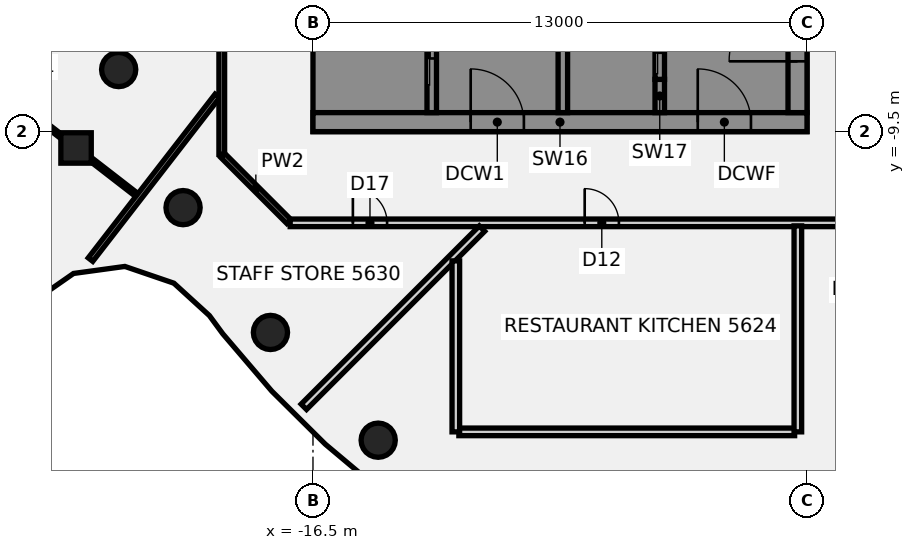
"""IFC4 building model, lengths in metres.
Left out: names, types, materials, properties, quantities, classifications, styles, units other than length and angle.
Written with IfcOpenShell. Run it as: python <this file> out.ifc"""

import sys

from ifc_helpers import new_model, si_unit, direction, frame, frame_2d, origin, origin_2d, place, context, subcontext, project, spatial, polyline, rectangle, circle, outline, extrude, element, fill, save


model = new_model("IFC4")
c1 = context("Model", 3, precision=1e-05, world=origin(), true_north=direction((0.0, 1.0)))
c2 = subcontext(c1, "Body", "Model", "MODEL_VIEW")
j1 = project(units=[si_unit("LENGTHUNIT", "METRE"), si_unit("PLANEANGLEUNIT", "RADIAN")], contexts=[c1])
p1 = place(None, origin())
s1 = spatial("IfcSite", under=j1, at=p1, CompositionType="ELEMENT")
p2 = place(p1, origin())
s2 = spatial("IfcBuilding", under=s1, at=p2, CompositionType="ELEMENT")
p3 = place(p2, frame((0.0, 0.0, 223.5)))
s3 = spatial("IfcBuildingStorey", under=s2, at=p3, CompositionType="ELEMENT", Elevation=223.5)
for number, where, z_axis, x_axis in (
    (1, (-21.613, -7.866, -0.14), (0.0, 0.0, 1.0), (1.0, 0.0, 0.0)),
    (2, (-19.919, -11.5, -0.14), (0.0, 0.0, 1.0), (1.0, 0.0, 0.0)),
    (3, (-17.619, -14.784, -0.14), (0.0, 0.0, 1.0), (1.0, 0.0, 0.0)),
    (4, (-14.784, -17.619, -0.14), (0.0, 0.0, 1.0), (1.0, 0.0, 0.0)),
):
    element("IfcColumn", number, at=place(p3, frame(where, z_axis=z_axis, x_axis=x_axis)), inside=s3, PredefinedType="COLUMN", context=c2, shape_type="SweptSolid", body=[
        extrude(circle(Radius=0.45, at=origin_2d()), origin(), (0.0, 0.0, 1.0), 3.6),
    ])
p4 = place(p3, frame((-22.734, -9.93, -0.139), z_axis=(0.050292303889, -0.003253410494, 0.998729242332), x_axis=(-0.789594273186, 0.612206971223, 0.041755336635)))
e5 = element("IfcColumn", 5, at=p4, inside=s3, PredefinedType="COLUMN", context=c2, shape_type="SweptSolid", body=[
    extrude(rectangle(XDim=0.8, YDim=0.8, at=origin_2d()), origin(), (0.0, 0.0, 1.0), 3.602),
])
p5 = place(p3, frame((-18.872, -10.128, 0.0), z_axis=(0.0, 0.0, 1.0), x_axis=(0.707106781187, -0.707106781187, 0.0)))
e6 = element("IfcWall", 6, at=p5, inside=s3, PredefinedType="PARTITIONING", context=c2, shape_type="SweptSolid", body=[
    extrude(rectangle(XDim=2.455, YDim=0.15, at=frame_2d((1.228, 0.0))), origin(), (0.0, 0.0, 1.0), 2.864),
])
p6 = place(p3, frame((-26.075, -7.343, 0.0), z_axis=(0.0, 0.0, 1.0), x_axis=(0.790607822881, -0.612322848177, 0.0)))
e7 = element("IfcWall", 7, at=p6, inside=s3, PredefinedType="PARTITIONING", context=c2, shape_type="SweptSolid", body=[
    extrude(rectangle(XDim=3.816, YDim=0.1, at=frame_2d((1.908, 0.0))), origin(), (0.0, 0.0, 1.0), 2.864),
])
p7 = place(p3, frame((-22.303, -10.264, 0.0), z_axis=(0.0, 0.0, 1.0), x_axis=(0.790625450637, -0.612300087216, 0.0)))
e8 = element("IfcWall", 8, at=p7, inside=s3, PredefinedType="PARTITIONING", context=c2, shape_type="SweptSolid", body=[
    extrude(rectangle(XDim=1.475, YDim=0.1, at=frame_2d((0.737, 0.0))), origin(), (0.0, 0.0, 1.0), 2.864),
])
p8 = place(p3, frame((-17.1, -11.9, 0.0), z_axis=(0.0, 0.0, 1.0), x_axis=(1.0, 0.0, 0.0)))
e9 = element("IfcWall", 9, at=p8, inside=s3, PredefinedType="PARTITIONING", context=c2, shape_type="SweptSolid", body=[
    extrude(rectangle(XDim=34.165, YDim=0.2, at=frame_2d((17.083, 0.0))), origin(), (0.0, 0.0, 1.0), 2.864),
])
p9 = place(p8, frame((7.75, 0.0, 0.0)))
e10 = element("IfcOpeningElement", 10, at=p9, cuts=e9, PredefinedType="OPENING", context=c2, shape_type="SweptSolid", body=[
    extrude(rectangle(XDim=0.9, YDim=2.1, at=frame_2d((0.45, 1.05))), frame((0.0, 0.11, 0.0), z_axis=(0.0, -1.0, 0.0), x_axis=(1.0, 0.0, 0.0)), (0.0, 0.0, 1.0), 0.22),
])
p10 = place(p8, frame((27.541, 0.0, 0.0)))
e11 = element("IfcOpeningElement", 11, at=p10, cuts=e9, PredefinedType="OPENING", context=c2, shape_type="SweptSolid", body=[
    extrude(rectangle(XDim=0.9, YDim=2.1, at=frame_2d((0.45, 1.05))), frame((0.0, 0.11, 0.0), z_axis=(0.0, -1.0, 0.0), x_axis=(1.0, 0.0, 0.0)), (0.0, 0.0, 1.0), 0.22),
])
p11 = place(p8, frame((16.059, 0.0, 0.0)))
e12 = element("IfcOpeningElement", 12, at=p11, cuts=e9, PredefinedType="OPENING", context=c2, shape_type="SweptSolid", body=[
    extrude(rectangle(XDim=1.8, YDim=2.1, at=frame_2d((0.9, 1.05))), frame((0.0, 0.11, 0.0), z_axis=(0.0, -1.0, 0.0), x_axis=(1.0, 0.0, 0.0)), (0.0, 0.0, 1.0), 0.22),
])
p12 = place(p8, frame((22.548, 0.0, 0.0)))
e13 = element("IfcOpeningElement", 13, at=p12, cuts=e9, PredefinedType="OPENING", context=c2, shape_type="SweptSolid", body=[
    extrude(rectangle(XDim=1.8, YDim=2.1, at=frame_2d((0.9, 1.05))), frame((0.0, 0.11, 0.0), z_axis=(0.0, -1.0, 0.0), x_axis=(1.0, 0.0, 0.0)), (0.0, 0.0, 1.0), 0.22),
])
p13 = place(p8, frame((30.5, 0.0, 0.0)))
e14 = element("IfcOpeningElement", 14, at=p13, cuts=e9, PredefinedType="OPENING", context=c2, shape_type="SweptSolid", body=[
    extrude(rectangle(XDim=0.9, YDim=2.1, at=frame_2d((0.45, 1.05))), frame((0.0, 0.11, 0.0), z_axis=(0.0, -1.0, 0.0), x_axis=(1.0, 0.0, 0.0)), (0.0, 0.0, 1.0), 0.22),
])
p14 = place(p8, frame((1.65, 0.0, 0.0)))
e15 = element("IfcOpeningElement", 15, at=p14, cuts=e9, PredefinedType="OPENING", context=c2, shape_type="SweptSolid", body=[
    extrude(rectangle(XDim=0.9, YDim=2.1, at=frame_2d((0.45, 1.05))), frame((0.0, 0.11, 0.0), z_axis=(0.0, -1.0, 0.0), x_axis=(1.0, 0.0, 0.0)), (0.0, 0.0, 1.0), 0.22),
])
p15 = place(p3, frame((-12.661, -17.4, 0.0), z_axis=(0.0, 0.0, 1.0), x_axis=(1.0, 0.0, 0.0)))
e16 = element("IfcWall", 16, at=p15, inside=s3, PredefinedType="PARTITIONING", context=c2, shape_type="SweptSolid", body=[
    extrude(rectangle(XDim=8.835, YDim=0.2, at=frame_2d((4.417, 0.0))), origin(), (0.0, 0.0, 1.0), 2.864),
])
p16 = place(p3, frame((-16.74, -16.74, 0.0), z_axis=(0.0, 0.0, 1.0), x_axis=(0.707106781187, 0.707106781187, 0.0)))
e17 = element("IfcWall", 17, at=p16, inside=s3, PredefinedType="PARTITIONING", context=c2, shape_type="SweptSolid", body=[
    extrude(rectangle(XDim=6.631, YDim=0.2, at=frame_2d((3.315, 0.0))), origin(), (0.0, 0.0, 1.0), 2.864),
])
p17 = place(p3, frame((-22.354, -12.868, 0.0), z_axis=(0.0, 0.0, 1.0), x_axis=(0.61237013934, 0.790571193787, 0.0)))
e18 = element("IfcWall", 18, at=p17, inside=s3, PredefinedType="PARTITIONING", context=c2, shape_type="SweptSolid", body=[
    extrude(rectangle(XDim=5.45, YDim=0.15, at=frame_2d((2.725, 0.0))), origin(), (0.0, 0.0, 1.0), 2.864),
])
p18 = place(p3, frame((-18.9, -10.1, 0.0), z_axis=(0.0, 0.0, 1.0), x_axis=(0.0, 1.0, 0.0)))
e19 = element("IfcWall", 19, at=p18, inside=s3, PredefinedType="PARTITIONING", context=c2, shape_type="SweptSolid", body=[
    extrude(rectangle(XDim=20.2, YDim=0.15, at=frame_2d((10.1, 0.0))), origin(), (0.0, 0.0, 1.0), 2.864),
])
p19 = place(p18, frame((13.439, 0.0, 0.0)))
e20 = element("IfcOpeningElement", 20, at=p19, cuts=e19, PredefinedType="OPENING", context=c2, shape_type="SweptSolid", body=[
    extrude(rectangle(XDim=1.8, YDim=2.1, at=frame_2d((0.9, 1.05))), frame((0.0, 0.085, 0.0), z_axis=(0.0, -1.0, 0.0), x_axis=(1.0, 0.0, 0.0)), (0.0, 0.0, 1.0), 0.17),
])
p20 = place(p18, frame((5.592, 0.0, 0.0)))
e21 = element("IfcOpeningElement", 21, at=p20, cuts=e19, PredefinedType="OPENING", context=c2, shape_type="SweptSolid", body=[
    extrude(rectangle(XDim=0.9, YDim=2.1, at=frame_2d((0.45, 1.05))), frame((0.0, 0.085, 0.0), z_axis=(0.0, -1.0, 0.0), x_axis=(1.0, 0.0, 0.0)), (0.0, 0.0, 1.0), 0.17),
])
p21 = place(p3, frame((-12.741, -17.4, 0.0), z_axis=(0.0, 0.0, 1.0), x_axis=(0.0, 1.0, 0.0)))
e22 = element("IfcWall", 22, at=p21, inside=s3, PredefinedType="PARTITIONING", context=c2, shape_type="SweptSolid", body=[
    extrude(rectangle(XDim=4.499, YDim=0.2, at=frame_2d((2.25, 0.0))), origin(), (0.0, 0.0, 1.0), 2.864),
])
p22 = place(p3, frame((-3.741, -17.4, 0.0), z_axis=(0.0, 0.0, 1.0), x_axis=(0.0, 1.0, 0.0)))
e23 = element("IfcWall", 23, at=p22, inside=s3, PredefinedType="PARTITIONING", context=c2, shape_type="SweptSolid", body=[
    extrude(rectangle(XDim=5.42, YDim=0.2, at=frame_2d((2.71, 0.0))), origin(), (0.0, 0.0, 1.0), 2.864),
])
p23 = place(p3, frame((-16.5, -9.25, 0.0), z_axis=(0.0, 0.0, 1.0), x_axis=(1.0, 0.0, 0.0)))
e24 = element("IfcWall", 24, at=p23, inside=s3, PredefinedType="SHEAR", context=c2, shape_type="SweptSolid", body=[
    extrude(rectangle(XDim=13.0, YDim=0.5, at=frame_2d((6.5, 0.0))), origin(), (0.0, 0.0, 1.0), 3.46),
])
p24 = place(p23, frame((4.15, 0.0, 0.0)))
e25 = element("IfcOpeningElement", 25, at=p24, cuts=e24, PredefinedType="OPENING", context=c2, shape_type="SweptSolid", body=[
    extrude(rectangle(XDim=1.4, YDim=2.1, at=frame_2d((0.7, 1.05))), frame((0.0, 0.26, 0.0), z_axis=(0.0, -1.0, 0.0), x_axis=(1.0, 0.0, 0.0)), (0.0, 0.0, 1.0), 0.52),
])
p25 = place(p23, frame((10.125, 0.0, 0.0)))
e26 = element("IfcOpeningElement", 26, at=p25, cuts=e24, PredefinedType="OPENING", context=c2, shape_type="SweptSolid", body=[
    extrude(rectangle(XDim=1.4, YDim=2.1, at=frame_2d((0.7, 1.05))), frame((0.0, 0.26, 0.0), z_axis=(0.0, -1.0, 0.0), x_axis=(1.0, 0.0, 0.0)), (0.0, 0.0, 1.0), 0.52),
])
p26 = place(p3, origin())
e27 = element("IfcWall", 27, at=p26, inside=s3, PredefinedType="SHEAR", context=c2, shape_type="SweptSolid", body=[
    extrude(outline(polyline([(-13.5, -8.125), (-16.0, -8.125), (-16.0, -5.625), (-13.5, -5.625), (-13.5, -5.375), (-16.0, -5.375), (-16.0, 5.375), (-13.5, 5.375), (-13.5, 5.625), (-16.0, 5.625), (-16.0, 8.125), (-13.5, 8.125), (-13.5, 9.0), (-16.0, 9.0), (-16.5, 9.0), (-16.5, -9.0), (-16.0, -9.0), (-13.5, -9.0), (-13.5, -8.125)])), origin(), (0.0, 0.0, 1.0), 3.46),
])
p27 = place(p3, origin())
e28 = element("IfcWall", 28, at=p27, inside=s3, PredefinedType="SHEAR", context=c2, shape_type="SweptSolid", body=[
    extrude(outline(polyline([(-7.5, -8.125), (-9.55, -8.125), (-9.55, -5.625), (-9.8, -5.625), (-9.8, -8.125), (-9.8, -9.0), (-7.5, -9.0), (-7.5, -8.125)])), origin(), (0.0, 0.0, 1.0), 3.46),
])
p28 = place(p3, frame((-7.375, -9.0, 0.0), z_axis=(0.0, 0.0, 1.0), x_axis=(0.0, 1.0, 0.0)))
e29 = element("IfcWall", 29, at=p28, inside=s3, PredefinedType="SHEAR", context=c2, shape_type="SweptSolid", body=[
    extrude(rectangle(XDim=0.875, YDim=0.25, at=frame_2d((0.438, 0.0))), origin(), (0.0, 0.0, 1.0), 3.46),
])
p29 = place(p3, frame((-13.375, -9.0, 0.0), z_axis=(0.0, 0.0, 1.0), x_axis=(0.0, 1.0, 0.0)))
e30 = element("IfcWall", 30, at=p29, inside=s3, PredefinedType="SHEAR", context=c2, shape_type="SweptSolid", body=[
    extrude(rectangle(XDim=18.0, YDim=0.25, at=frame_2d((9.0, 0.0))), origin(), (0.0, 0.0, 1.0), 3.46),
])
p30 = place(p29, frame((1.425, 0.0, 0.0)))
e31 = element("IfcOpeningElement", 31, at=p30, cuts=e30, PredefinedType="OPENING", context=c2, shape_type="SweptSolid", body=[
    extrude(rectangle(XDim=1.4, YDim=2.1, at=frame_2d((0.7, 1.05))), frame((0.0, 0.135, 0.0), z_axis=(0.0, -1.0, 0.0), x_axis=(1.0, 0.0, 0.0)), (0.0, 0.0, 1.0), 0.27),
])
p31 = place(p29, frame((6.646, 0.0, 0.0)))
e32 = element("IfcOpeningElement", 32, at=p31, cuts=e30, PredefinedType="OPENING", context=c2, shape_type="SweptSolid", body=[
    extrude(rectangle(XDim=1.0, YDim=2.1, at=frame_2d((0.5, 1.05))), frame((0.0, 0.135, 0.0), z_axis=(0.0, -1.0, 0.0), x_axis=(1.0, 0.0, 0.0)), (0.0, 0.0, 1.0), 0.27),
])
p32 = place(p29, frame((12.146, 0.0, 0.0)))
e33 = element("IfcOpeningElement", 33, at=p32, cuts=e30, PredefinedType="OPENING", context=c2, shape_type="SweptSolid", body=[
    extrude(rectangle(XDim=1.0, YDim=2.1, at=frame_2d((0.5, 1.05))), frame((0.0, 0.135, 0.0), z_axis=(0.0, -1.0, 0.0), x_axis=(1.0, 0.0, 0.0)), (0.0, 0.0, 1.0), 0.27),
])
p33 = place(p3, frame((-9.925, -9.0, 0.0), z_axis=(0.0, 0.0, 1.0), x_axis=(0.0, 1.0, 0.0)))
e34 = element("IfcWall", 34, at=p33, inside=s3, PredefinedType="SHEAR", context=c2, shape_type="SweptSolid", body=[
    extrude(rectangle(XDim=18.0, YDim=0.25, at=frame_2d((9.0, 0.0))), origin(), (0.0, 0.0, 1.0), 3.46),
])
p34 = place(p33, frame((12.575, 0.0, 0.0)))
e35 = element("IfcOpeningElement", 35, at=p34, cuts=e34, PredefinedType="OPENING", context=c2, shape_type="SweptSolid", body=[
    extrude(rectangle(XDim=1.1, YDim=2.1, at=frame_2d((0.55, 1.05))), frame((0.0, 0.135, 0.0), z_axis=(0.0, -1.0, 0.0), x_axis=(1.0, 0.0, 0.0)), (0.0, 0.0, 1.0), 0.27),
])
p35 = place(p33, frame((15.325, 0.0, 0.0)))
e36 = element("IfcOpeningElement", 36, at=p35, cuts=e34, PredefinedType="OPENING", context=c2, shape_type="SweptSolid", body=[
    extrude(rectangle(XDim=1.1, YDim=2.1, at=frame_2d((0.55, 1.05))), frame((0.0, 0.135, 0.0), z_axis=(0.0, -1.0, 0.0), x_axis=(1.0, 0.0, 0.0)), (0.0, 0.0, 1.0), 0.27),
])
p36 = place(p33, frame((5.75, 0.0, 0.0)))
e37 = element("IfcOpeningElement", 37, at=p36, cuts=e34, PredefinedType="OPENING", context=c2, shape_type="SweptSolid", body=[
    extrude(rectangle(XDim=1.0, YDim=2.1, at=frame_2d((0.5, 1.05))), frame((0.0, 0.135, 0.0), z_axis=(0.0, -1.0, 0.0), x_axis=(1.0, 0.0, 0.0)), (0.0, 0.0, 1.0), 0.27),
])
p37 = place(p33, frame((9.396, 0.0, 0.0)))
e38 = element("IfcOpeningElement", 38, at=p37, cuts=e34, PredefinedType="OPENING", context=c2, shape_type="SweptSolid", body=[
    extrude(rectangle(XDim=1.0, YDim=2.1, at=frame_2d((0.5, 1.05))), frame((0.0, 0.135, 0.0), z_axis=(0.0, -1.0, 0.0), x_axis=(1.0, 0.0, 0.0)), (0.0, 0.0, 1.0), 0.27),
])
p38 = place(p33, frame((10.771, 0.0, 0.0)))
e39 = element("IfcOpeningElement", 39, at=p38, cuts=e34, PredefinedType="OPENING", context=c2, shape_type="SweptSolid", body=[
    extrude(rectangle(XDim=1.0, YDim=2.1, at=frame_2d((0.5, 1.05))), frame((0.0, 0.135, 0.0), z_axis=(0.0, -1.0, 0.0), x_axis=(1.0, 0.0, 0.0)), (0.0, 0.0, 1.0), 0.27),
])
p39 = place(p3, frame((-7.375, -8.125, 0.0), z_axis=(0.0, 0.0, 1.0), x_axis=(0.0, 1.0, 0.0)))
e40 = element("IfcWall", 40, at=p39, inside=s3, PredefinedType="SHEAR", context=c2, shape_type="SweptSolid", body=[
    extrude(rectangle(XDim=2.5, YDim=0.25, at=frame_2d((1.25, 0.0))), origin(), (0.0, 0.0, 1.0), 3.46),
])
p40 = place(p39, frame((0.7, 0.0, 0.0)))
e41 = element("IfcOpeningElement", 41, at=p40, cuts=e40, PredefinedType="OPENING", context=c2, shape_type="SweptSolid", body=[
    extrude(rectangle(XDim=1.1, YDim=2.1, at=frame_2d((0.55, 1.05))), frame((0.0, 0.135, 0.0), z_axis=(0.0, -1.0, 0.0), x_axis=(1.0, 0.0, 0.0)), (0.0, 0.0, 1.0), 0.27),
])
p41 = place(p3, frame((-3.75, -9.0, 0.0), z_axis=(0.0, 0.0, 1.0), x_axis=(0.0, 1.0, 0.0)))
e42 = element("IfcWall", 42, at=p41, inside=s3, PredefinedType="SHEAR", context=c2, shape_type="SweptSolid", body=[
    extrude(rectangle(XDim=18.0, YDim=0.5, at=frame_2d((9.0, 0.0))), origin(), (0.0, 0.0, 1.0), 3.46),
])
p42 = place(p41, frame((1.35, 0.0, 0.0)))
e43 = element("IfcOpeningElement", 43, at=p42, cuts=e42, PredefinedType="OPENING", context=c2, shape_type="SweptSolid", body=[
    extrude(rectangle(XDim=1.8, YDim=2.1, at=frame_2d((0.9, 1.05))), frame((0.0, 0.26, 0.0), z_axis=(0.0, -1.0, 0.0), x_axis=(1.0, 0.0, 0.0)), (0.0, 0.0, 1.0), 0.52),
])
p43 = place(p41, frame((12.478, 0.0, 0.0)))
e44 = element("IfcOpeningElement", 44, at=p43, cuts=e42, PredefinedType="OPENING", context=c2, shape_type="SweptSolid", body=[
    extrude(rectangle(XDim=1.0, YDim=2.1, at=frame_2d((0.5, 1.05))), frame((0.0, 0.26, 0.0), z_axis=(0.0, -1.0, 0.0), x_axis=(1.0, 0.0, 0.0)), (0.0, 0.0, 1.0), 0.52),
])
p44 = place(p41, frame((16.002, 0.0, 0.0)))
e45 = element("IfcOpeningElement", 45, at=p44, cuts=e42, PredefinedType="OPENING", context=c2, shape_type="SweptSolid", body=[
    extrude(rectangle(XDim=1.0, YDim=2.1, at=frame_2d((0.5, 1.05))), frame((0.0, 0.26, 0.0), z_axis=(0.0, -1.0, 0.0), x_axis=(1.0, 0.0, 0.0)), (0.0, 0.0, 1.0), 0.52),
])
p45 = place(p9, frame((0.9, 0.0, 0.0), z_axis=(0.0, 0.0, 1.0), x_axis=(-1.0, 0.0, 0.0)))
e46 = element("IfcDoor", 46, at=p45, inside=s3, OperationType="SINGLE_SWING_LEFT", PredefinedType="DOOR", context=c2, shape_type="SweptSolid", body=[
    extrude(rectangle(XDim=0.9, YDim=2.1, at=frame_2d((0.45, 1.05))), frame((0.0, 0.025, 0.0), z_axis=(0.0, -1.0, 0.0), x_axis=(1.0, 0.0, 0.0)), (0.0, 0.0, 1.0), 0.05),
])
fill(e10, e46)
p46 = place(p14, frame((0.9, 0.0, 0.0), z_axis=(0.0, 0.0, 1.0), x_axis=(-1.0, 0.0, 0.0)))
e47 = element("IfcDoor", 47, at=p46, inside=s3, OperationType="SINGLE_SWING_LEFT", PredefinedType="DOOR", context=c2, shape_type="SweptSolid", body=[
    extrude(rectangle(XDim=0.9, YDim=2.1, at=frame_2d((0.45, 1.05))), frame((0.0, 0.025, 0.0), z_axis=(0.0, -1.0, 0.0), x_axis=(1.0, 0.0, 0.0)), (0.0, 0.0, 1.0), 0.05),
])
fill(e15, e47)
p47 = place(p24, origin())
e48 = element("IfcDoor", 48, at=p47, inside=s3, OperationType="SINGLE_SWING_LEFT", PredefinedType="DOOR", context=c2, shape_type="SweptSolid", body=[
    extrude(rectangle(XDim=1.4, YDim=2.1, at=frame_2d((0.7, 1.05))), frame((0.0, 0.025, 0.0), z_axis=(0.0, -1.0, 0.0), x_axis=(1.0, 0.0, 0.0)), (0.0, 0.0, 1.0), 0.05),
])
fill(e25, e48)
p48 = place(p25, origin())
e49 = element("IfcDoor", 49, at=p48, inside=s3, OperationType="SINGLE_SWING_LEFT", PredefinedType="DOOR", context=c2, shape_type="SweptSolid", body=[
    extrude(rectangle(XDim=1.4, YDim=2.1, at=frame_2d((0.7, 1.05))), frame((0.0, 0.025, 0.0), z_axis=(0.0, -1.0, 0.0), x_axis=(1.0, 0.0, 0.0)), (0.0, 0.0, 1.0), 0.05),
])
fill(e26, e49)
p49 = place(p42, origin())
e50 = element("IfcDoor", 50, at=p49, inside=s3, OperationType="SINGLE_SWING_LEFT", PredefinedType="DOOR", context=c2, shape_type="SweptSolid", body=[
    extrude(rectangle(XDim=1.8, YDim=2.1, at=frame_2d((0.9, 1.05))), frame((0.0, 0.025, 0.0), z_axis=(0.0, -1.0, 0.0), x_axis=(1.0, 0.0, 0.0)), (0.0, 0.0, 1.0), 0.05),
])
fill(e43, e50)
p50 = place(p30, origin())
e51 = element("IfcDoor", 51, at=p50, inside=s3, OperationType="SLIDING_TO_LEFT", PredefinedType="DOOR", context=c2, shape_type="SweptSolid", body=[
    extrude(rectangle(XDim=1.4, YDim=2.1, at=frame_2d((0.7, 1.05))), frame((0.0, 0.025, 0.0), z_axis=(0.0, -1.0, 0.0), x_axis=(1.0, 0.0, 0.0)), (0.0, 0.0, 1.0), 0.05),
])
fill(e31, e51)
p51 = place(p40, origin())
e52 = element("IfcDoor", 52, at=p51, inside=s3, OperationType="SLIDING_TO_LEFT", PredefinedType="DOOR", context=c2, shape_type="SweptSolid", body=[
    extrude(rectangle(XDim=1.1, YDim=2.1, at=frame_2d((0.55, 1.05))), frame((0.0, 0.025, 0.0), z_axis=(0.0, -1.0, 0.0), x_axis=(1.0, 0.0, 0.0)), (0.0, 0.0, 1.0), 0.05),
])
fill(e41, e52)
save(model, sys.argv[1])
